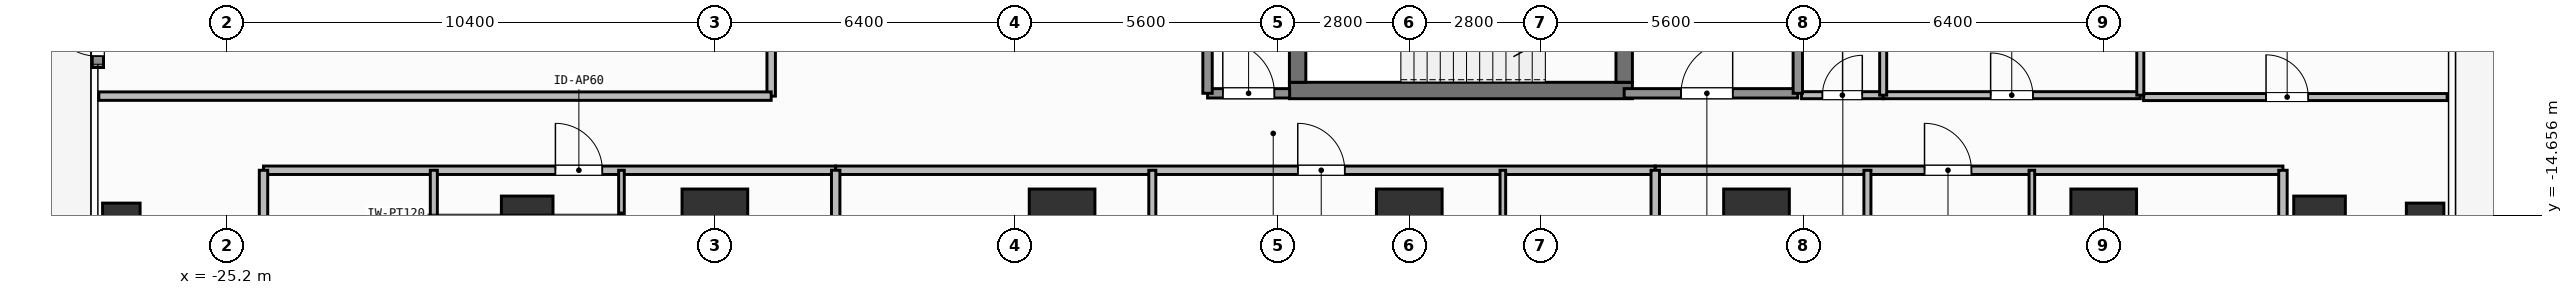
"""IFC4 building model, lengths in metres.
Left out: names, types, materials, properties, quantities, classifications, styles, units other than length and angle.
Written with IfcOpenShell. Run it as: python <this file> out.ifc"""

import sys

from ifc_helpers import new_model, si_unit, direction, frame, frame_2d, origin, origin_2d, place, context, subcontext, project, spatial, rectangle, hollow_rectangle, extrude, element, fill, save


model = new_model("IFC4")
c1 = context("Model", 3, precision=1e-05, world=origin(), true_north=direction((0.0, 1.0)))
c2 = subcontext(c1, "Body", "Model", "MODEL_VIEW")
j1 = project(units=[si_unit("LENGTHUNIT", "METRE"), si_unit("PLANEANGLEUNIT", "RADIAN")], contexts=[c1])
p1 = place(None, origin())
s1 = spatial("IfcSite", under=j1, at=p1, CompositionType="ELEMENT")
p2 = place(p1, origin())
s2 = spatial("IfcBuilding", under=s1, at=p2, CompositionType="ELEMENT")
p3 = place(p2, frame((0.0, 0.0, 57.9)))
s3 = spatial("IfcBuildingStorey", under=s2, at=p3, CompositionType="ELEMENT", Elevation=57.9)
p4 = place(p3, frame((-2.555, -12.0, 0.0), z_axis=(0.0, 0.0, 1.0), x_axis=(1.0, 0.0, 0.0)))
e1 = element("IfcWall", 1, at=p4, inside=s3, PredefinedType="SHEAR", context=c2, shape_type="SweptSolid", body=[
    extrude(rectangle(XDim=7.31, YDim=0.35, at=frame_2d((3.655, 0.0))), origin(), (0.0, 0.0, 1.0), 3.9),
])
p5 = place(p3, frame((-2.38, -11.825, 0.0), z_axis=(0.0, 0.0, 1.0), x_axis=(0.0, 1.0, 0.0)))
e2 = element("IfcWall", 2, at=p5, inside=s3, PredefinedType="SHEAR", context=c2, shape_type="SweptSolid", body=[
    extrude(rectangle(XDim=2.925, YDim=0.35, at=frame_2d((1.462, 0.0))), origin(), (0.0, 0.0, 1.0), 3.9),
])
p6 = place(p3, frame((4.58, -8.9, 0.0), z_axis=(0.0, 0.0, 1.0), x_axis=(0.0, -1.0, 0.0)))
e3 = element("IfcWall", 3, at=p6, inside=s3, PredefinedType="SHEAR", context=c2, shape_type="SweptSolid", body=[
    extrude(rectangle(XDim=2.925, YDim=0.35, at=frame_2d((1.462, 0.0))), origin(), (0.0, 0.0, 1.0), 3.9),
])
p7 = place(p6, frame((0.913, 0.0, 0.0)))
e4 = element("IfcOpeningElement", 4, at=p7, cuts=e3, PredefinedType="OPENING", context=c2, shape_type="SweptSolid", body=[
    extrude(rectangle(XDim=1.1, YDim=2.15, at=frame_2d((0.55, 1.075))), frame((0.0, 0.185, 0.0), z_axis=(0.0, -1.0, 0.0), x_axis=(1.0, 0.0, 0.0)), (0.0, 0.0, 1.0), 0.37),
])
for number, where, z_axis, x_axis in (
    (5, (-14.8, -14.8, 0.0), (0.0, 0.0, 1.0), (1.0, 0.0, 0.0)),
    (6, (-7.4, -14.8, 0.0), (0.0, 0.0, 1.0), (1.0, 0.0, 0.0)),
    (7, (0.0, -14.8, 0.0), (0.0, 0.0, 1.0), (1.0, 0.0, 0.0)),
    (8, (7.4, -14.8, 0.0), (0.0, 0.0, 1.0), (1.0, 0.0, 0.0)),
    (9, (14.8, -14.8, 0.0), (0.0, 0.0, 1.0), (1.0, 0.0, 0.0)),
):
    element("IfcColumn", number, at=place(p3, frame(where, z_axis=z_axis, x_axis=x_axis)), inside=s3, PredefinedType="COLUMN", context=c2, shape_type="SweptSolid", body=[
        extrude(rectangle(XDim=1.4, YDim=1.4, at=origin_2d()), origin(), (0.0, 0.0, 1.0), 3.9),
    ])
for number, where, z_axis, x_axis in (
    (10, (-18.8, -14.8, 0.0), (0.0, 0.0, 1.0), (1.0, 0.0, 0.0)),
    (11, (19.4, -14.8, 0.0), (0.0, 0.0, 1.0), (1.0, 0.0, 0.0)),
):
    element("IfcColumn", number, at=place(p3, frame(where, z_axis=z_axis, x_axis=x_axis)), inside=s3, PredefinedType="COLUMN", context=c2, shape_type="SweptSolid", body=[
        extrude(rectangle(XDim=1.1, YDim=1.1, at=origin_2d()), origin(), (0.0, 0.0, 1.0), 3.9),
    ])
for number, where, z_axis, x_axis in (
    (12, (-27.45, -14.8, 0.0), (0.0, 0.0, 1.0), (1.0, 0.0, 0.0)),
    (13, (21.65, -14.8, 0.0), (0.0, 0.0, 1.0), (1.0, 0.0, 0.0)),
):
    element("IfcColumn", number, at=place(p3, frame(where, z_axis=z_axis, x_axis=x_axis)), inside=s3, PredefinedType="COLUMN", context=c2, shape_type="SweptSolid", body=[
        extrude(hollow_rectangle(XDim=0.8, YDim=0.8, WallThickness=0.036, at=origin_2d()), origin(), (0.0, 0.0, 1.0), 3.9),
    ])
p8 = place(p3, frame((-27.95, -11.51, 0.0), z_axis=(0.0, 0.0, 1.0), x_axis=(0.0, 1.0, 0.0)))
e14 = element("IfcWall", 14, at=p8, inside=s3, PredefinedType="SOLIDWALL", context=c2, shape_type="SweptSolid", body=[
    extrude(rectangle(XDim=1.58, YDim=0.24, at=frame_2d((0.79, 0.0))), origin(), (0.0, 0.0, 1.0), 3.68),
])
p9 = place(p8, frame((0.24, 0.0, 0.0)))
e15 = element("IfcOpeningElement", 15, at=p9, cuts=e14, PredefinedType="OPENING", context=c2, shape_type="SweptSolid", body=[
    extrude(rectangle(XDim=1.1, YDim=2.2, at=frame_2d((0.55, 1.1))), frame((0.0, 0.13, 0.0), z_axis=(0.0, -1.0, 0.0), x_axis=(1.0, 0.0, 0.0)), (0.0, 0.0, 1.0), 0.26),
])
p10 = place(p3, frame((4.58, -12.06, 0.0), z_axis=(0.0, 0.0, 1.0), x_axis=(1.0, 0.0, 0.0)))
e16 = element("IfcWall", 16, at=p10, inside=s3, PredefinedType="SOLIDWALL", context=c2, shape_type="SweptSolid", body=[
    extrude(rectangle(XDim=3.7, YDim=0.2, at=frame_2d((1.85, 0.0))), origin(), (0.0, 0.0, 1.0), 3.68),
])
p11 = place(p10, frame((1.212, 0.0, 0.0)))
e17 = element("IfcOpeningElement", 17, at=p11, cuts=e16, PredefinedType="OPENING", context=c2, shape_type="SweptSolid", body=[
    extrude(rectangle(XDim=1.1, YDim=2.15, at=frame_2d((0.55, 1.075))), frame((0.0, 0.11, 0.0), z_axis=(0.0, -1.0, 0.0), x_axis=(1.0, 0.0, 0.0)), (0.0, 0.0, 1.0), 0.22),
])
p12 = place(p3, frame((-4.3, -12.06, 0.0), z_axis=(0.0, 0.0, 1.0), x_axis=(1.0, 0.0, 0.0)))
e18 = element("IfcWall", 18, at=p12, inside=s3, PredefinedType="SOLIDWALL", context=c2, shape_type="SweptSolid", body=[
    extrude(rectangle(XDim=1.75, YDim=0.2, at=frame_2d((0.875, 0.0))), origin(), (0.0, 0.0, 1.0), 3.68),
])
p13 = place(p12, frame((0.325, 0.0, 0.0)))
e19 = element("IfcOpeningElement", 19, at=p13, cuts=e18, PredefinedType="OPENING", context=c2, shape_type="SweptSolid", body=[
    extrude(rectangle(XDim=1.1, YDim=2.15, at=frame_2d((0.55, 1.075))), frame((0.0, 0.11, 0.0), z_axis=(0.0, -1.0, 0.0), x_axis=(1.0, 0.0, 0.0)), (0.0, 0.0, 1.0), 0.22),
])
p14 = place(p3, frame((8.36, -12.1, 0.0), z_axis=(0.0, 0.0, 1.0), x_axis=(1.0, 0.0, 0.0)))
e20 = element("IfcWall", 20, at=p14, inside=s3, PredefinedType="PARTITIONING", context=c2, shape_type="SweptSolid", body=[
    extrude(rectangle(XDim=1.74, YDim=0.15, at=frame_2d((0.87, 0.0))), origin(), (0.0, 0.0, 1.0), 3.68),
])
p15 = place(p14, frame((0.445, 0.0, 0.0)))
e21 = element("IfcOpeningElement", 21, at=p15, cuts=e20, PredefinedType="OPENING", context=c2, shape_type="SweptSolid", body=[
    extrude(rectangle(XDim=0.85, YDim=2.1, at=frame_2d((0.425, 1.05))), frame((0.0, 0.085, 0.0), z_axis=(0.0, -1.0, 0.0), x_axis=(1.0, 0.0, 0.0)), (0.0, 0.0, 1.0), 0.17),
])
p16 = place(p3, frame((10.1, -12.1, 0.0), z_axis=(0.0, 0.0, 1.0), x_axis=(1.0, 0.0, 0.0)))
e22 = element("IfcWall", 22, at=p16, inside=s3, PredefinedType="PARTITIONING", context=c2, shape_type="SweptSolid", body=[
    extrude(rectangle(XDim=5.48, YDim=0.15, at=frame_2d((2.74, 0.0))), origin(), (0.0, 0.0, 1.0), 3.68),
])
p17 = place(p16, frame((2.29, 0.0, 0.0)))
e23 = element("IfcOpeningElement", 23, at=p17, cuts=e22, PredefinedType="OPENING", context=c2, shape_type="SweptSolid", body=[
    extrude(rectangle(XDim=0.9, YDim=2.1, at=frame_2d((0.45, 1.05))), frame((0.0, 0.085, 0.0), z_axis=(0.0, -1.0, 0.0), x_axis=(1.0, 0.0, 0.0)), (0.0, 0.0, 1.0), 0.17),
])
p18 = place(p3, frame((-24.42, -13.7, 0.0), z_axis=(0.0, 0.0, 1.0), x_axis=(1.0, 0.0, 0.0)))
e24 = element("IfcWall", 24, at=p18, inside=s3, PredefinedType="PARTITIONING", context=c2, shape_type="SweptSolid", body=[
    extrude(rectangle(XDim=12.195, YDim=0.18, at=frame_2d((6.097, 0.0))), origin(), (0.0, 0.0, 1.0), 3.68),
])
p19 = place(p18, frame((6.221, 0.0, 0.0)))
e25 = element("IfcOpeningElement", 25, at=p19, cuts=e24, PredefinedType="OPENING", context=c2, shape_type="SweptSolid", body=[
    extrude(rectangle(XDim=1.0, YDim=2.2, at=frame_2d((0.5, 1.1))), frame((0.0, 0.1, 0.0), z_axis=(0.0, -1.0, 0.0), x_axis=(1.0, 0.0, 0.0)), (0.0, 0.0, 1.0), 0.2),
])
p20 = place(p3, frame((-20.79, -20.79, 0.0), z_axis=(0.0, 0.0, 1.0), x_axis=(0.0, 1.0, 0.0)))
e26 = element("IfcWall", 26, at=p20, inside=s3, PredefinedType="PARTITIONING", context=c2, shape_type="SweptSolid", body=[
    extrude(rectangle(XDim=7.09, YDim=0.15, at=frame_2d((3.545, 0.0))), origin(), (0.0, 0.0, 1.0), 3.68),
])
p21 = place(p20, frame((3.03, 0.0, 0.0)))
e27 = element("IfcOpeningElement", 27, at=p21, cuts=e26, PredefinedType="OPENING", context=c2, shape_type="SweptSolid", body=[
    extrude(rectangle(XDim=0.85, YDim=2.1, at=frame_2d((0.425, 1.05))), frame((0.0, 0.085, 0.0), z_axis=(0.0, -1.0, 0.0), x_axis=(1.0, 0.0, 0.0)), (0.0, 0.0, 1.0), 0.17),
])
p22 = place(p3, frame((-16.791, -17.1, 0.0), z_axis=(0.0, 0.0, 1.0), x_axis=(0.0, 1.0, 0.0)))
e28 = element("IfcWall", 28, at=p22, inside=s3, PredefinedType="PARTITIONING", context=c2, shape_type="SweptSolid", body=[
    extrude(rectangle(XDim=3.4, YDim=0.12, at=frame_2d((1.7, 0.0))), origin(), (0.0, 0.0, 1.0), 3.68),
])
p23 = place(p22, frame((0.675, 0.0, 0.0)))
e29 = element("IfcOpeningElement", 29, at=p23, cuts=e28, PredefinedType="OPENING", context=c2, shape_type="SweptSolid", body=[
    extrude(rectangle(XDim=0.85, YDim=2.1, at=frame_2d((0.425, 1.05))), frame((0.0, 0.07, 0.0), z_axis=(0.0, -1.0, 0.0), x_axis=(1.0, 0.0, 0.0)), (0.0, 0.0, 1.0), 0.14),
])
p24 = place(p3, frame((-12.225, -13.7, 0.0), z_axis=(0.0, 0.0, 1.0), x_axis=(1.0, 0.0, 0.0)))
e30 = element("IfcWall", 30, at=p24, inside=s3, PredefinedType="PARTITIONING", context=c2, shape_type="SweptSolid", body=[
    extrude(rectangle(XDim=17.467, YDim=0.18, at=frame_2d((8.733, 0.0))), origin(), (0.0, 0.0, 1.0), 3.68),
])
p25 = place(p24, frame((9.848, 0.0, 0.0)))
e31 = element("IfcOpeningElement", 31, at=p25, cuts=e30, PredefinedType="OPENING", context=c2, shape_type="SweptSolid", body=[
    extrude(rectangle(XDim=1.0, YDim=2.2, at=frame_2d((0.5, 1.1))), frame((0.0, 0.1, 0.0), z_axis=(0.0, -1.0, 0.0), x_axis=(1.0, 0.0, 0.0)), (0.0, 0.0, 1.0), 0.2),
])
p26 = place(p3, frame((-5.477, -16.678, 0.0), z_axis=(0.0, 0.0, 1.0), x_axis=(0.0, 1.0, 0.0)))
e32 = element("IfcWall", 32, at=p26, inside=s3, PredefinedType="PARTITIONING", context=c2, shape_type="SweptSolid", body=[
    extrude(rectangle(XDim=2.978, YDim=0.15, at=frame_2d((1.489, 0.0))), origin(), (0.0, 0.0, 1.0), 3.68),
])
p27 = place(p3, frame((1.994, -18.096, 0.0), z_axis=(0.0, 0.0, 1.0), x_axis=(0.0, 1.0, 0.0)))
e33 = element("IfcWall", 33, at=p27, inside=s3, PredefinedType="PARTITIONING", context=c2, shape_type="SweptSolid", body=[
    extrude(rectangle(XDim=4.396, YDim=0.12, at=frame_2d((2.198, 0.0))), origin(), (0.0, 0.0, 1.0), 3.68),
])
p28 = place(p27, frame((1.594, 0.0, 0.0)))
e34 = element("IfcOpeningElement", 34, at=p28, cuts=e33, PredefinedType="OPENING", context=c2, shape_type="SweptSolid", body=[
    extrude(rectangle(XDim=0.85, YDim=2.1, at=frame_2d((0.425, 1.05))), frame((0.0, 0.07, 0.0), z_axis=(0.0, -1.0, 0.0), x_axis=(1.0, 0.0, 0.0)), (0.0, 0.0, 1.0), 0.14),
])
p29 = place(p3, frame((5.242, -13.7, 0.0), z_axis=(0.0, 0.0, 1.0), x_axis=(1.0, 0.0, 0.0)))
e35 = element("IfcWall", 35, at=p29, inside=s3, PredefinedType="PARTITIONING", context=c2, shape_type="SweptSolid", body=[
    extrude(rectangle(XDim=13.378, YDim=0.18, at=frame_2d((6.689, 0.0))), origin(), (0.0, 0.0, 1.0), 3.68),
])
p30 = place(p29, frame((5.739, 0.0, 0.0)))
e36 = element("IfcOpeningElement", 36, at=p30, cuts=e35, PredefinedType="OPENING", context=c2, shape_type="SweptSolid", body=[
    extrude(rectangle(XDim=1.0, YDim=2.2, at=frame_2d((0.5, 1.1))), frame((0.0, 0.1, 0.0), z_axis=(0.0, -1.0, 0.0), x_axis=(1.0, 0.0, 0.0)), (0.0, 0.0, 1.0), 0.2),
])
p31 = place(p3, frame((9.764, -20.79, 0.0), z_axis=(0.0, 0.0, 1.0), x_axis=(0.0, 1.0, 0.0)))
e37 = element("IfcWall", 37, at=p31, inside=s3, PredefinedType="PARTITIONING", context=c2, shape_type="SweptSolid", body=[
    extrude(rectangle(XDim=7.09, YDim=0.15, at=frame_2d((3.545, 0.0))), origin(), (0.0, 0.0, 1.0), 3.68),
])
p32 = place(p31, frame((3.03, 0.0, 0.0)))
e38 = element("IfcOpeningElement", 38, at=p32, cuts=e37, PredefinedType="OPENING", context=c2, shape_type="SweptSolid", body=[
    extrude(rectangle(XDim=0.85, YDim=2.1, at=frame_2d((0.425, 1.05))), frame((0.0, 0.085, 0.0), z_axis=(0.0, -1.0, 0.0), x_axis=(1.0, 0.0, 0.0)), (0.0, 0.0, 1.0), 0.17),
])
p33 = place(p3, frame((13.269, -18.663, 0.0), z_axis=(0.0, 0.0, 1.0), x_axis=(0.0, 1.0, 0.0)))
e39 = element("IfcWall", 39, at=p33, inside=s3, PredefinedType="PARTITIONING", context=c2, shape_type="SweptSolid", body=[
    extrude(rectangle(XDim=4.963, YDim=0.12, at=frame_2d((2.481, 0.0))), origin(), (0.0, 0.0, 1.0), 3.68),
])
p34 = place(p33, frame((2.229, 0.0, 0.0)))
e40 = element("IfcOpeningElement", 40, at=p34, cuts=e39, PredefinedType="OPENING", context=c2, shape_type="SweptSolid", body=[
    extrude(rectangle(XDim=0.85, YDim=2.1, at=frame_2d((0.425, 1.05))), frame((0.0, 0.07, 0.0), z_axis=(0.0, -1.0, 0.0), x_axis=(1.0, 0.0, 0.0)), (0.0, 0.0, 1.0), 0.14),
])
p35 = place(p3, frame((-13.6, -12.12, 0.0), z_axis=(0.0, 0.0, 1.0), x_axis=(0.0, 1.0, 0.0)))
e41 = element("IfcWall", 41, at=p35, inside=s3, PredefinedType="PARTITIONING", context=c2, shape_type="SweptSolid", body=[
    extrude(rectangle(XDim=9.389, YDim=0.18, at=frame_2d((4.695, 0.0))), origin(), (0.0, 0.0, 1.0), 3.68),
])
p36 = place(p35, frame((1.415, 0.0, 0.0)))
e42 = element("IfcOpeningElement", 42, at=p36, cuts=e41, PredefinedType="OPENING", context=c2, shape_type="SweptSolid", body=[
    extrude(rectangle(XDim=1.0, YDim=2.2, at=frame_2d((0.5, 1.1))), frame((0.0, 0.1, 0.0), z_axis=(0.0, -1.0, 0.0), x_axis=(1.0, 0.0, 0.0)), (0.0, 0.0, 1.0), 0.2),
])
p37 = place(p3, frame((15.65, -12.14, 0.0), z_axis=(0.0, 0.0, 1.0), x_axis=(1.0, 0.0, 0.0)))
e43 = element("IfcWall", 43, at=p37, inside=s3, PredefinedType="PARTITIONING", context=c2, shape_type="SweptSolid", body=[
    extrude(rectangle(XDim=6.47, YDim=0.15, at=frame_2d((3.235, 0.0))), origin(), (0.0, 0.0, 1.0), 3.68),
])
p38 = place(p37, frame((2.61, 0.0, 0.0)))
e44 = element("IfcOpeningElement", 44, at=p38, cuts=e43, PredefinedType="OPENING", context=c2, shape_type="SweptSolid", body=[
    extrude(rectangle(XDim=0.9, YDim=2.1, at=frame_2d((0.45, 1.05))), frame((0.0, 0.085, 0.0), z_axis=(0.0, -1.0, 0.0), x_axis=(1.0, 0.0, 0.0)), (0.0, 0.0, 1.0), 0.17),
])
for number, where, z_axis, x_axis in (
    (45, (8.28, -12.06, 0.0), (0.0, 0.0, 1.0), (0.0, 1.0, 0.0)),
    (46, (-4.3, -12.06, 0.0), (0.0, 0.0, 1.0), (0.0, 1.0, 0.0)),
):
    element("IfcWall", number, at=place(p3, frame(where, z_axis=z_axis, x_axis=x_axis)), inside=s3, PredefinedType="SOLIDWALL", context=c2, shape_type="SweptSolid", body=[
        extrude(rectangle(XDim=3.11, YDim=0.2, at=frame_2d((1.555, 0.0))), origin(), (0.0, 0.0, 1.0), 3.68),
    ])
p39 = place(p3, frame((10.1, -12.1, 0.0), z_axis=(0.0, 0.0, 1.0), x_axis=(0.0, 1.0, 0.0)))
e47 = element("IfcWall", 47, at=p39, inside=s3, PredefinedType="PARTITIONING", context=c2, shape_type="SweptSolid", body=[
    extrude(rectangle(XDim=2.35, YDim=0.15, at=frame_2d((1.175, 0.0))), origin(), (0.0, 0.0, 1.0), 3.68),
])
p40 = place(p3, frame((15.58, -12.1, 0.0), z_axis=(0.0, 0.0, 1.0), x_axis=(0.0, 1.0, 0.0)))
e48 = element("IfcWall", 48, at=p40, inside=s3, PredefinedType="PARTITIONING", context=c2, shape_type="SweptSolid", body=[
    extrude(rectangle(XDim=6.25, YDim=0.15, at=frame_2d((3.125, 0.0))), origin(), (0.0, 0.0, 1.0), 3.68),
])
for number, where, z_axis, x_axis in (
    (49, (-24.42, -23.91, 0.0), (0.0, 0.0, 1.0), (0.0, 1.0, 0.0)),
    (50, (18.62, -23.91, 0.0), (0.0, 0.0, 1.0), (0.0, 1.0, 0.0)),
):
    element("IfcWall", number, at=place(p3, frame(where, z_axis=z_axis, x_axis=x_axis)), inside=s3, PredefinedType="PARTITIONING", context=c2, shape_type="SweptSolid", body=[
        extrude(rectangle(XDim=10.21, YDim=0.18, at=frame_2d((5.105, 0.0))), origin(), (0.0, 0.0, 1.0), 3.68),
    ])
for number, where, z_axis, x_axis in (
    (51, (-12.225, -25.03, 0.0), (0.0, 0.0, 1.0), (0.0, 1.0, 0.0)),
    (52, (5.242, -25.03, 0.0), (0.0, 0.0, 1.0), (0.0, 1.0, 0.0)),
):
    element("IfcWall", number, at=place(p3, frame(where, z_axis=z_axis, x_axis=x_axis)), inside=s3, PredefinedType="PARTITIONING", context=c2, shape_type="SweptSolid", body=[
        extrude(rectangle(XDim=11.33, YDim=0.18, at=frame_2d((5.665, 0.0))), origin(), (0.0, 0.0, 1.0), 3.68),
    ])
p41 = place(p3, frame((-27.93, -12.12, 0.0), z_axis=(0.0, 0.0, 1.0), x_axis=(1.0, 0.0, 0.0)))
e53 = element("IfcWall", 53, at=p41, inside=s3, PredefinedType="PARTITIONING", context=c2, shape_type="SweptSolid", body=[
    extrude(rectangle(XDim=14.33, YDim=0.18, at=frame_2d((7.165, 0.0))), origin(), (0.0, 0.0, 1.0), 3.68),
])
p42 = place(p9, origin())
e54 = element("IfcDoor", 54, at=p42, inside=s3, OperationType="SINGLE_SWING_RIGHT", PredefinedType="DOOR", context=c2, shape_type="SweptSolid", body=[
    extrude(rectangle(XDim=1.1, YDim=2.2, at=frame_2d((0.55, 1.1))), frame((0.0, 0.025, 0.0), z_axis=(0.0, -1.0, 0.0), x_axis=(1.0, 0.0, 0.0)), (0.0, 0.0, 1.0), 0.05),
])
fill(e15, e54)
p43 = place(p11, origin())
e55 = element("IfcDoor", 55, at=p43, inside=s3, OperationType="SINGLE_SWING_RIGHT", PredefinedType="DOOR", context=c2, shape_type="SweptSolid", body=[
    extrude(rectangle(XDim=1.1, YDim=2.15, at=frame_2d((0.55, 1.075))), frame((0.0, 0.025, 0.0), z_axis=(0.0, -1.0, 0.0), x_axis=(1.0, 0.0, 0.0)), (0.0, 0.0, 1.0), 0.05),
])
fill(e17, e55)
p44 = place(p13, origin())
e56 = element("IfcDoor", 56, at=p44, inside=s3, OperationType="SINGLE_SWING_LEFT", PredefinedType="DOOR", context=c2, shape_type="SweptSolid", body=[
    extrude(rectangle(XDim=1.1, YDim=2.15, at=frame_2d((0.55, 1.075))), frame((0.0, 0.025, 0.0), z_axis=(0.0, -1.0, 0.0), x_axis=(1.0, 0.0, 0.0)), (0.0, 0.0, 1.0), 0.05),
])
fill(e19, e56)
p45 = place(p15, origin())
e57 = element("IfcDoor", 57, at=p45, inside=s3, OperationType="SINGLE_SWING_RIGHT", PredefinedType="DOOR", context=c2, shape_type="SweptSolid", body=[
    extrude(rectangle(XDim=0.85, YDim=2.1, at=frame_2d((0.425, 1.05))), frame((0.0, 0.025, 0.0), z_axis=(0.0, -1.0, 0.0), x_axis=(1.0, 0.0, 0.0)), (0.0, 0.0, 1.0), 0.05),
])
fill(e21, e57)
p46 = place(p17, origin())
e58 = element("IfcDoor", 58, at=p46, inside=s3, OperationType="SINGLE_SWING_LEFT", PredefinedType="DOOR", context=c2, shape_type="SweptSolid", body=[
    extrude(rectangle(XDim=0.9, YDim=2.1, at=frame_2d((0.45, 1.05))), frame((0.0, 0.025, 0.0), z_axis=(0.0, -1.0, 0.0), x_axis=(1.0, 0.0, 0.0)), (0.0, 0.0, 1.0), 0.05),
])
fill(e23, e58)
p47 = place(p19, origin())
e59 = element("IfcDoor", 59, at=p47, inside=s3, OperationType="SINGLE_SWING_LEFT", PredefinedType="DOOR", context=c2, shape_type="SweptSolid", body=[
    extrude(rectangle(XDim=1.0, YDim=2.2, at=frame_2d((0.5, 1.1))), frame((0.0, 0.025, 0.0), z_axis=(0.0, -1.0, 0.0), x_axis=(1.0, 0.0, 0.0)), (0.0, 0.0, 1.0), 0.05),
])
fill(e25, e59)
p48 = place(p25, origin())
e60 = element("IfcDoor", 60, at=p48, inside=s3, OperationType="SINGLE_SWING_LEFT", PredefinedType="DOOR", context=c2, shape_type="SweptSolid", body=[
    extrude(rectangle(XDim=1.0, YDim=2.2, at=frame_2d((0.5, 1.1))), frame((0.0, 0.025, 0.0), z_axis=(0.0, -1.0, 0.0), x_axis=(1.0, 0.0, 0.0)), (0.0, 0.0, 1.0), 0.05),
])
fill(e31, e60)
p49 = place(p30, origin())
e61 = element("IfcDoor", 61, at=p49, inside=s3, OperationType="SINGLE_SWING_LEFT", PredefinedType="DOOR", context=c2, shape_type="SweptSolid", body=[
    extrude(rectangle(XDim=1.0, YDim=2.2, at=frame_2d((0.5, 1.1))), frame((0.0, 0.025, 0.0), z_axis=(0.0, -1.0, 0.0), x_axis=(1.0, 0.0, 0.0)), (0.0, 0.0, 1.0), 0.05),
])
fill(e36, e61)
p50 = place(p38, origin())
e62 = element("IfcDoor", 62, at=p50, inside=s3, OperationType="SINGLE_SWING_LEFT", PredefinedType="DOOR", context=c2, shape_type="SweptSolid", body=[
    extrude(rectangle(XDim=0.9, YDim=2.1, at=frame_2d((0.45, 1.05))), frame((0.0, 0.025, 0.0), z_axis=(0.0, -1.0, 0.0), x_axis=(1.0, 0.0, 0.0)), (0.0, 0.0, 1.0), 0.05),
])
fill(e44, e62)
save(model, sys.argv[1])
